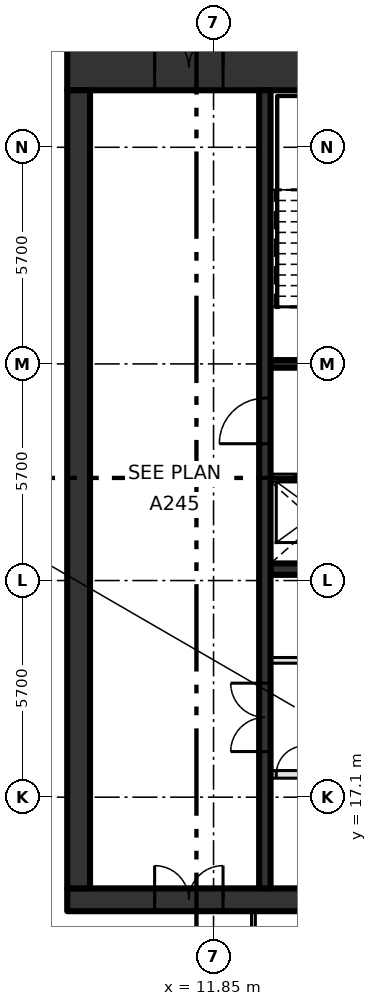
"""IFC4 building model, lengths in metres.
Left out: names, types, materials, properties, quantities, classifications, styles, units other than length and angle.
Written with IfcOpenShell. Run it as: python <this file> out.ifc"""

import sys

from ifc_helpers import new_model, si_unit, direction, frame, frame_2d, origin, place, context, subcontext, project, spatial, rectangle, extrude, element, fill, save


model = new_model("IFC4")
c1 = context("Model", 3, precision=1e-05, world=origin(), true_north=direction((0.0, 1.0)))
c2 = subcontext(c1, "Body", "Model", "MODEL_VIEW")
j1 = project(units=[si_unit("LENGTHUNIT", "METRE"), si_unit("PLANEANGLEUNIT", "RADIAN")], contexts=[c1])
p1 = place(None, origin())
s1 = spatial("IfcSite", under=j1, at=p1, CompositionType="ELEMENT")
p2 = place(p1, origin())
s2 = spatial("IfcBuilding", under=s1, at=p2, CompositionType="ELEMENT")
p3 = place(p2, frame((0.0, 0.0, 344.4)))
s3 = spatial("IfcBuildingStorey", under=s2, at=p3, CompositionType="ELEMENT", Elevation=344.4)
p4 = place(p3, frame((8.0, 14.4, -0.3), z_axis=(0.0, 0.0, 1.0), x_axis=(1.0, 0.0, 0.0)))
e1 = element("IfcWall", 1, at=p4, inside=s3, PredefinedType="SHEAR", context=c2, shape_type="SweptSolid", body=[
    extrude(rectangle(XDim=22.8, YDim=0.6, at=frame_2d((11.4, 0.0))), origin(), (0.0, 0.0, 1.0), 4.05),
])
p5 = place(p4, frame((2.3, 0.0, 0.3)))
e2 = element("IfcOpeningElement", 2, at=p5, cuts=e1, PredefinedType="OPENING", context=c2, shape_type="SweptSolid", body=[
    extrude(rectangle(XDim=1.8, YDim=2.1, at=frame_2d((0.9, 1.05))), frame((0.0, 0.31, 0.0), z_axis=(0.0, -1.0, 0.0), x_axis=(1.0, 0.0, 0.0)), (0.0, 0.0, 1.0), 0.62),
])
p6 = place(p3, frame((8.0, 36.3, -0.3), z_axis=(0.0, 0.0, 1.0), x_axis=(1.0, 0.0, 0.0)))
e3 = element("IfcWall", 3, at=p6, inside=s3, PredefinedType="SHEAR", context=c2, shape_type="SweptSolid", body=[
    extrude(rectangle(XDim=22.8, YDim=1.2, at=frame_2d((11.4, 0.0))), origin(), (0.0, 0.0, 1.0), 4.05),
])
p7 = place(p6, frame((2.3, 0.0, 0.3)))
e4 = element("IfcOpeningElement", 4, at=p7, cuts=e3, PredefinedType="OPENING", context=c2, shape_type="SweptSolid", body=[
    extrude(rectangle(XDim=1.8, YDim=2.1, at=frame_2d((0.9, 1.05))), frame((0.0, 0.61, 0.0), z_axis=(0.0, -1.0, 0.0), x_axis=(1.0, 0.0, 0.0)), (0.0, 0.0, 1.0), 1.22),
])
p8 = place(p3, frame((8.3, 14.7, -0.3), z_axis=(0.0, 0.0, 1.0), x_axis=(0.0, 1.0, 0.0)))
e5 = element("IfcWall", 5, at=p8, inside=s3, PredefinedType="SHEAR", context=c2, shape_type="SweptSolid", body=[
    extrude(rectangle(XDim=21.0, YDim=0.6, at=frame_2d((10.5, 0.0))), origin(), (0.0, 0.0, 1.0), 4.05),
])
p9 = place(p3, frame((13.35, 17.7, 0.0), z_axis=(0.0, 0.0, 1.0), x_axis=(1.0, 0.0, 0.0)))
e6 = element("IfcWall", 6, at=p9, inside=s3, PredefinedType="SOLIDWALL", context=c2, shape_type="SweptSolid", body=[
    extrude(rectangle(XDim=13.425, YDim=0.2, at=frame_2d((6.712, 0.0))), origin(), (0.0, 0.0, 1.0), 3.75),
])
p10 = place(p9, frame((2.0, 0.0, 0.0)))
e7 = element("IfcOpeningElement", 7, at=p10, cuts=e6, PredefinedType="OPENING", context=c2, shape_type="SweptSolid", body=[
    extrude(rectangle(XDim=1.1, YDim=2.1, at=frame_2d((0.55, 1.05))), frame((0.0, 0.11, 0.0), z_axis=(0.0, -1.0, 0.0), x_axis=(1.0, 0.0, 0.0)), (0.0, 0.0, 1.0), 0.22),
])
p11 = place(p9, frame((4.7, 0.0, 0.0)))
e8 = element("IfcOpeningElement", 8, at=p11, cuts=e6, PredefinedType="OPENING", context=c2, shape_type="SweptSolid", body=[
    extrude(rectangle(XDim=1.1, YDim=2.1, at=frame_2d((0.55, 1.05))), frame((0.0, 0.11, 0.0), z_axis=(0.0, -1.0, 0.0), x_axis=(1.0, 0.0, 0.0)), (0.0, 0.0, 1.0), 0.22),
])
p12 = place(p9, frame((7.4, 0.0, 0.0)))
e9 = element("IfcOpeningElement", 9, at=p12, cuts=e6, PredefinedType="OPENING", context=c2, shape_type="SweptSolid", body=[
    extrude(rectangle(XDim=1.1, YDim=2.1, at=frame_2d((0.55, 1.05))), frame((0.0, 0.11, 0.0), z_axis=(0.0, -1.0, 0.0), x_axis=(1.0, 0.0, 0.0)), (0.0, 0.0, 1.0), 0.22),
])
p13 = place(p9, frame((10.1, 0.0, 0.0)))
e10 = element("IfcOpeningElement", 10, at=p13, cuts=e6, PredefinedType="OPENING", context=c2, shape_type="SweptSolid", body=[
    extrude(rectangle(XDim=1.1, YDim=2.1, at=frame_2d((0.55, 1.05))), frame((0.0, 0.11, 0.0), z_axis=(0.0, -1.0, 0.0), x_axis=(1.0, 0.0, 0.0)), (0.0, 0.0, 1.0), 0.22),
])
p14 = place(p9, frame((0.15, 0.0, 0.0)))
e11 = element("IfcOpeningElement", 11, at=p14, cuts=e6, PredefinedType="OPENING", context=c2, shape_type="SweptSolid", body=[
    extrude(rectangle(XDim=0.75, YDim=2.1, at=frame_2d((0.375, 1.05))), frame((0.0, 0.11, 0.0), z_axis=(0.0, -1.0, 0.0), x_axis=(1.0, 0.0, 0.0)), (0.0, 0.0, 1.0), 0.22),
])
p15 = place(p9, frame((12.3, 0.0, 0.0)))
e12 = element("IfcOpeningElement", 12, at=p15, cuts=e6, PredefinedType="OPENING", context=c2, shape_type="SweptSolid", body=[
    extrude(rectangle(XDim=0.75, YDim=2.1, at=frame_2d((0.375, 1.05))), frame((0.0, 0.11, 0.0), z_axis=(0.0, -1.0, 0.0), x_axis=(1.0, 0.0, 0.0)), (0.0, 0.0, 1.0), 0.22),
])
p16 = place(p3, frame((13.35, 20.7, 0.0), z_axis=(0.0, 0.0, 1.0), x_axis=(1.0, 0.0, 0.0)))
e13 = element("IfcWall", 13, at=p16, inside=s3, PredefinedType="PARTITIONING", context=c2, shape_type="SweptSolid", body=[
    extrude(rectangle(XDim=13.425, YDim=0.15, at=frame_2d((6.712, 0.0))), origin(), (0.0, 0.0, 1.0), 3.75),
])
p17 = place(p16, frame((4.8, 0.0, 0.0)))
e14 = element("IfcOpeningElement", 14, at=p17, cuts=e13, PredefinedType="OPENING", context=c2, shape_type="SweptSolid", body=[
    extrude(rectangle(XDim=0.9, YDim=2.1, at=frame_2d((0.45, 1.05))), frame((0.0, 0.085, 0.0), z_axis=(0.0, -1.0, 0.0), x_axis=(1.0, 0.0, 0.0)), (0.0, 0.0, 1.0), 0.17),
])
p18 = place(p16, frame((11.55, 0.0, 0.0)))
e15 = element("IfcOpeningElement", 15, at=p18, cuts=e13, PredefinedType="OPENING", context=c2, shape_type="SweptSolid", body=[
    extrude(rectangle(XDim=0.9, YDim=2.1, at=frame_2d((0.45, 1.05))), frame((0.0, 0.085, 0.0), z_axis=(0.0, -1.0, 0.0), x_axis=(1.0, 0.0, 0.0)), (0.0, 0.0, 1.0), 0.17),
])
p19 = place(p3, frame((13.35, 23.1, 0.0), z_axis=(0.0, 0.0, 1.0), x_axis=(1.0, 0.0, 0.0)))
e16 = element("IfcWall", 16, at=p19, inside=s3, PredefinedType="SHEAR", context=c2, shape_type="SweptSolid", body=[
    extrude(rectangle(XDim=16.85, YDim=0.3, at=frame_2d((8.425, 0.0))), origin(), (0.0, 0.0, 1.0), 3.75),
])
p20 = place(p3, frame((13.35, 25.5, 0.0), z_axis=(0.0, 0.0, 1.0), x_axis=(1.0, 0.0, 0.0)))
e17 = element("IfcWall", 17, at=p20, inside=s3, PredefinedType="SOLIDWALL", context=c2, shape_type="SweptSolid", body=[
    extrude(rectangle(XDim=16.85, YDim=0.2, at=frame_2d((8.425, 0.0))), origin(), (0.0, 0.0, 1.0), 3.75),
])
p21 = place(p20, frame((0.65, 0.0, 0.0)))
e18 = element("IfcOpeningElement", 18, at=p21, cuts=e17, PredefinedType="OPENING", context=c2, shape_type="SweptSolid", body=[
    extrude(rectangle(XDim=1.1, YDim=2.1, at=frame_2d((0.55, 1.05))), frame((0.0, 0.11, 0.0), z_axis=(0.0, -1.0, 0.0), x_axis=(1.0, 0.0, 0.0)), (0.0, 0.0, 1.0), 0.22),
])
p22 = place(p20, frame((3.35, 0.0, 0.0)))
e19 = element("IfcOpeningElement", 19, at=p22, cuts=e17, PredefinedType="OPENING", context=c2, shape_type="SweptSolid", body=[
    extrude(rectangle(XDim=1.1, YDim=2.1, at=frame_2d((0.55, 1.05))), frame((0.0, 0.11, 0.0), z_axis=(0.0, -1.0, 0.0), x_axis=(1.0, 0.0, 0.0)), (0.0, 0.0, 1.0), 0.22),
])
p23 = place(p20, frame((6.05, 0.0, 0.0)))
e20 = element("IfcOpeningElement", 20, at=p23, cuts=e17, PredefinedType="OPENING", context=c2, shape_type="SweptSolid", body=[
    extrude(rectangle(XDim=1.1, YDim=2.1, at=frame_2d((0.55, 1.05))), frame((0.0, 0.11, 0.0), z_axis=(0.0, -1.0, 0.0), x_axis=(1.0, 0.0, 0.0)), (0.0, 0.0, 1.0), 0.22),
])
p24 = place(p20, frame((8.75, 0.0, 0.0)))
e21 = element("IfcOpeningElement", 21, at=p24, cuts=e17, PredefinedType="OPENING", context=c2, shape_type="SweptSolid", body=[
    extrude(rectangle(XDim=1.1, YDim=2.1, at=frame_2d((0.55, 1.05))), frame((0.0, 0.11, 0.0), z_axis=(0.0, -1.0, 0.0), x_axis=(1.0, 0.0, 0.0)), (0.0, 0.0, 1.0), 0.22),
])
p25 = place(p20, frame((13.0, 0.0, 0.0)))
e22 = element("IfcOpeningElement", 22, at=p25, cuts=e17, PredefinedType="OPENING", context=c2, shape_type="SweptSolid", body=[
    extrude(rectangle(XDim=0.9, YDim=2.1, at=frame_2d((0.45, 1.05))), frame((0.0, 0.11, 0.0), z_axis=(0.0, -1.0, 0.0), x_axis=(1.0, 0.0, 0.0)), (0.0, 0.0, 1.0), 0.22),
])
p26 = place(p3, frame((13.35, 28.5, 0.0), z_axis=(0.0, 0.0, 1.0), x_axis=(1.0, 0.0, 0.0)))
e23 = element("IfcWall", 23, at=p26, inside=s3, PredefinedType="SOLIDWALL", context=c2, shape_type="SweptSolid", body=[
    extrude(rectangle(XDim=6.75, YDim=0.2, at=frame_2d((3.375, 0.0))), origin(), (0.0, 0.0, 1.0), 3.75),
])
p27 = place(p26, frame((0.95, 0.0, 0.0)))
e24 = element("IfcOpeningElement", 24, at=p27, cuts=e23, PredefinedType="OPENING", context=c2, shape_type="SweptSolid", body=[
    extrude(rectangle(XDim=1.2, YDim=2.1, at=frame_2d((0.6, 1.05))), frame((0.0, 0.11, 0.0), z_axis=(0.0, -1.0, 0.0), x_axis=(1.0, 0.0, 0.0)), (0.0, 0.0, 1.0), 0.22),
])
p28 = place(p26, frame((3.75, 0.0, 0.0)))
e25 = element("IfcOpeningElement", 25, at=p28, cuts=e23, PredefinedType="OPENING", context=c2, shape_type="SweptSolid", body=[
    extrude(rectangle(XDim=1.1, YDim=2.1, at=frame_2d((0.55, 1.05))), frame((0.0, 0.11, 0.0), z_axis=(0.0, -1.0, 0.0), x_axis=(1.0, 0.0, 0.0)), (0.0, 0.0, 1.0), 0.22),
])
p29 = place(p3, frame((13.2, 14.7, 0.0), z_axis=(0.0, 0.0, 1.0), x_axis=(0.0, 1.0, 0.0)))
e26 = element("IfcWall", 26, at=p29, inside=s3, PredefinedType="SHEAR", context=c2, shape_type="SweptSolid", body=[
    extrude(rectangle(XDim=21.0, YDim=0.3, at=frame_2d((10.5, 0.0))), origin(), (0.0, 0.0, 1.0), 3.75),
])
p30 = place(p29, frame((3.6, 0.0, 0.0)))
e27 = element("IfcOpeningElement", 27, at=p30, cuts=e26, PredefinedType="OPENING", context=c2, shape_type="SweptSolid", body=[
    extrude(rectangle(XDim=1.8, YDim=2.1, at=frame_2d((0.9, 1.05))), frame((0.0, 0.16, 0.0), z_axis=(0.0, -1.0, 0.0), x_axis=(1.0, 0.0, 0.0)), (0.0, 0.0, 1.0), 0.32),
])
p31 = place(p29, frame((11.7, 0.0, 0.0)))
e28 = element("IfcOpeningElement", 28, at=p31, cuts=e26, PredefinedType="OPENING", context=c2, shape_type="SweptSolid", body=[
    extrude(rectangle(XDim=1.2, YDim=2.1, at=frame_2d((0.6, 1.05))), frame((0.0, 0.16, 0.0), z_axis=(0.0, -1.0, 0.0), x_axis=(1.0, 0.0, 0.0)), (0.0, 0.0, 1.0), 0.32),
])
p32 = place(p3, frame((12.9, 10.078, 0.0), z_axis=(0.0, 0.0, 1.0), x_axis=(0.0, 1.0, 0.0)))
e29 = element("IfcWall", 29, at=p32, inside=s3, PredefinedType="PARTITIONING", context=c2, shape_type="SweptSolid", body=[
    extrude(rectangle(XDim=4.022, YDim=0.1, at=frame_2d((2.011, 0.0))), origin(), (0.0, 0.0, 1.0), 3.75),
])
p33 = place(p32, frame((1.48, 0.0, 0.0)))
e30 = element("IfcOpeningElement", 30, at=p33, cuts=e29, PredefinedType="OPENING", context=c2, shape_type="SweptSolid", body=[
    extrude(rectangle(XDim=1.0, YDim=2.1, at=frame_2d((0.5, 1.05))), frame((0.0, 0.06, 0.0), z_axis=(0.0, -1.0, 0.0), x_axis=(1.0, 0.0, 0.0)), (0.0, 0.0, 1.0), 0.12),
])
p34 = place(p21, origin())
e31 = element("IfcDoor", 31, at=p34, inside=s3, OperationType="SLIDING_TO_LEFT", PredefinedType="DOOR", context=c2, shape_type="SweptSolid", body=[
    extrude(rectangle(XDim=1.1, YDim=2.1, at=frame_2d((0.55, 1.05))), frame((0.0, 0.025, 0.0), z_axis=(0.0, -1.0, 0.0), x_axis=(1.0, 0.0, 0.0)), (0.0, 0.0, 1.0), 0.05),
])
fill(e18, e31)
p35 = place(p14, origin())
e32 = element("IfcDoor", 32, at=p35, inside=s3, OperationType="SINGLE_SWING_RIGHT", PredefinedType="DOOR", context=c2, shape_type="SweptSolid", body=[
    extrude(rectangle(XDim=0.75, YDim=2.1, at=frame_2d((0.375, 1.05))), frame((0.0, 0.025, 0.0), z_axis=(0.0, -1.0, 0.0), x_axis=(1.0, 0.0, 0.0)), (0.0, 0.0, 1.0), 0.05),
])
fill(e11, e32)
p36 = place(p30, origin())
e33 = element("IfcDoor", 33, at=p36, inside=s3, OperationType="DOUBLE_DOOR_SINGLE_SWING", PredefinedType="DOOR", context=c2, shape_type="SweptSolid", body=[
    extrude(rectangle(XDim=1.8, YDim=2.1, at=frame_2d((0.9, 1.05))), frame((0.0, 0.025, 0.0), z_axis=(0.0, -1.0, 0.0), x_axis=(1.0, 0.0, 0.0)), (0.0, 0.0, 1.0), 0.05),
])
fill(e27, e33)
p37 = place(p31, origin())
e34 = element("IfcDoor", 34, at=p37, inside=s3, OperationType="SINGLE_SWING_LEFT", PredefinedType="DOOR", context=c2, shape_type="SweptSolid", body=[
    extrude(rectangle(XDim=1.2, YDim=2.1, at=frame_2d((0.6, 1.05))), frame((0.0, 0.025, 0.0), z_axis=(0.0, -1.0, 0.0), x_axis=(1.0, 0.0, 0.0)), (0.0, 0.0, 1.0), 0.05),
])
fill(e28, e34)
p38 = place(p7, origin())
e35 = element("IfcDoor", 35, at=p38, inside=s3, OperationType="DOUBLE_DOOR_SINGLE_SWING", PredefinedType="DOOR", context=c2, shape_type="SweptSolid", body=[
    extrude(rectangle(XDim=1.8, YDim=2.1, at=frame_2d((0.9, 1.05))), frame((0.0, 0.025, 0.0), z_axis=(0.0, -1.0, 0.0), x_axis=(1.0, 0.0, 0.0)), (0.0, 0.0, 1.0), 0.05),
])
fill(e4, e35)
p39 = place(p5, origin())
e36 = element("IfcDoor", 36, at=p39, inside=s3, OperationType="DOUBLE_DOOR_SINGLE_SWING", PredefinedType="DOOR", context=c2, shape_type="SweptSolid", body=[
    extrude(rectangle(XDim=1.8, YDim=2.1, at=frame_2d((0.9, 1.05))), frame((0.0, 0.025, 0.0), z_axis=(0.0, -1.0, 0.0), x_axis=(1.0, 0.0, 0.0)), (0.0, 0.0, 1.0), 0.05),
])
fill(e2, e36)
save(model, sys.argv[1])
